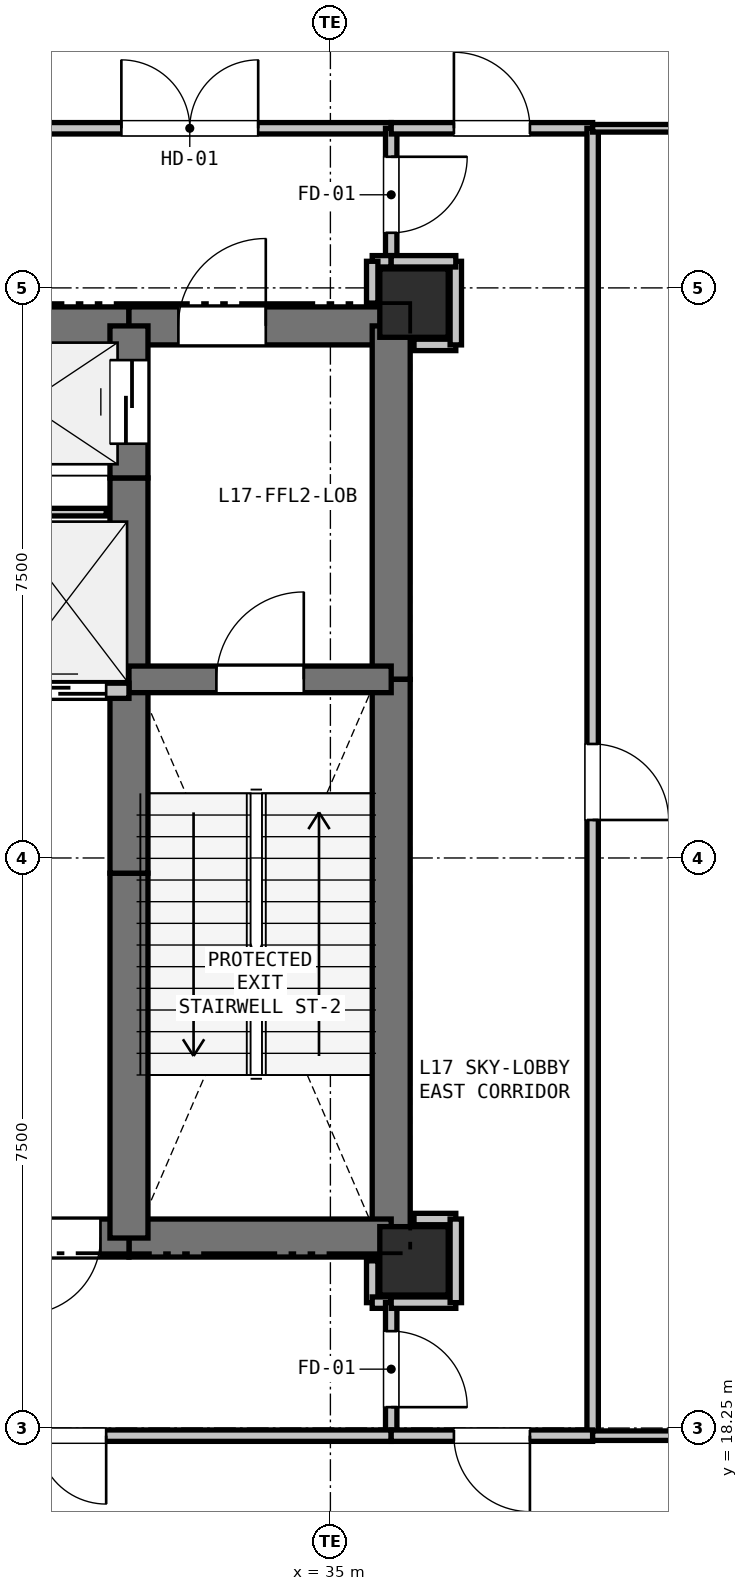
"""IFC4 building model, lengths in metres.
Left out: names, types, materials, properties, quantities, classifications, styles, units other than length and angle.
Written with IfcOpenShell. Run it as: python <this file> out.ifc"""

import sys

from ifc_helpers import new_model, si_unit, direction, frame, frame_2d, origin, origin_2d, place, context, subcontext, project, spatial, rectangle, extrude, element, fill, save


model = new_model("IFC4")
c1 = context("Model", 3, precision=1e-05, world=origin(), true_north=direction((0.0, 1.0)))
c2 = subcontext(c1, "Body", "Model", "MODEL_VIEW")
j1 = project(units=[si_unit("LENGTHUNIT", "METRE"), si_unit("PLANEANGLEUNIT", "RADIAN")], contexts=[c1])
p1 = place(None, origin())
s1 = spatial("IfcSite", under=j1, at=p1, CompositionType="ELEMENT")
p2 = place(p1, origin())
s2 = spatial("IfcBuilding", under=s1, at=p2, CompositionType="ELEMENT")
p3 = place(p2, frame((0.0, 0.0, 62.1)))
s3 = spatial("IfcBuildingStorey", under=s2, at=p3, CompositionType="ELEMENT", Elevation=62.1)
for number, where, z_axis, x_axis in (
    (1, (36.1, 33.05, 0.0), (0.0, 0.0, 1.0), (1.0, 0.0, 0.0)),
    (2, (36.1, 20.45, 0.0), (0.0, 0.0, 1.0), (1.0, 0.0, 0.0)),
):
    element("IfcColumn", number, at=place(p3, frame(where, z_axis=z_axis, x_axis=x_axis)), inside=s3, PredefinedType="COLUMN", context=c2, shape_type="SweptSolid", body=[
        extrude(rectangle(XDim=0.9, YDim=0.9, at=origin_2d()), origin(), (0.0, 0.0, 1.0), 4.8),
    ])
p4 = place(p3, frame((29.65, 32.75, 0.0), z_axis=(0.0, 0.0, 1.0), x_axis=(1.0, 0.0, 0.0)))
e3 = element("IfcWall", 3, at=p4, inside=s3, PredefinedType="SHEAR", context=c2, shape_type="SweptSolid", body=[
    extrude(rectangle(XDim=2.7, YDim=0.5, at=frame_2d((1.35, 0.0))), origin(), (0.0, 0.0, 1.0), 4.48),
])
p5 = place(p3, frame((32.35, 32.75, 0.0), z_axis=(0.0, 0.0, 1.0), x_axis=(1.0, 0.0, 0.0)))
e4 = element("IfcWall", 4, at=p5, inside=s3, PredefinedType="SHEAR", context=c2, shape_type="SweptSolid", body=[
    extrude(rectangle(XDim=3.45, YDim=0.5, at=frame_2d((1.725, 0.0))), origin(), (0.0, 0.0, 1.0), 4.48),
])
p6 = place(p5, frame((0.65, 0.0, 0.0)))
e5 = element("IfcOpeningElement", 5, at=p6, cuts=e4, PredefinedType="OPENING", context=c2, shape_type="SweptSolid", body=[
    extrude(rectangle(XDim=1.15, YDim=2.15, at=frame_2d((0.575, 1.075))), frame((0.0, 0.26, 0.0), z_axis=(0.0, -1.0, 0.0), x_axis=(1.0, 0.0, 0.0)), (0.0, 0.0, 1.0), 0.52),
])
p7 = place(p3, frame((35.8, 32.75, 0.0), z_axis=(0.0, 0.0, 1.0), x_axis=(0.0, -1.0, 0.0)))
e6 = element("IfcWall", 6, at=p7, inside=s3, PredefinedType="SHEAR", context=c2, shape_type="SweptSolid", body=[
    extrude(rectangle(XDim=4.65, YDim=0.5, at=frame_2d((2.325, 0.0))), origin(), (0.0, 0.0, 1.0), 4.48),
])
p8 = place(p3, frame((35.8, 28.1, 0.0), z_axis=(0.0, 0.0, 1.0), x_axis=(0.0, -1.0, 0.0)))
e7 = element("IfcWall", 7, at=p8, inside=s3, PredefinedType="SHEAR", context=c2, shape_type="SweptSolid", body=[
    extrude(rectangle(XDim=7.35, YDim=0.5, at=frame_2d((3.675, 0.0))), origin(), (0.0, 0.0, 1.0), 4.48),
])
p9 = place(p3, frame((35.8, 20.75, 0.0), z_axis=(0.0, 0.0, 1.0), x_axis=(-1.0, 0.0, 0.0)))
e8 = element("IfcWall", 8, at=p9, inside=s3, PredefinedType="SHEAR", context=c2, shape_type="SweptSolid", body=[
    extrude(rectangle(XDim=3.45, YDim=0.5, at=frame_2d((1.725, 0.0))), origin(), (0.0, 0.0, 1.0), 4.48),
])
p10 = place(p3, frame((32.35, 20.75, 0.0), z_axis=(0.0, 0.0, 1.0), x_axis=(-1.0, 0.0, 0.0)))
e9 = element("IfcWall", 9, at=p10, inside=s3, PredefinedType="SHEAR", context=c2, shape_type="SweptSolid", body=[
    extrude(rectangle(XDim=1.75, YDim=0.5, at=frame_2d((0.875, 0.0))), origin(), (0.0, 0.0, 1.0), 4.48),
])
p11 = place(p10, frame((0.375, 0.0, 0.0)))
e10 = element("IfcOpeningElement", 10, at=p11, cuts=e9, PredefinedType="OPENING", context=c2, shape_type="SweptSolid", body=[
    extrude(rectangle(XDim=1.0, YDim=2.15, at=frame_2d((0.5, 1.075))), frame((0.0, 0.26, 0.0), z_axis=(0.0, -1.0, 0.0), x_axis=(1.0, 0.0, 0.0)), (0.0, 0.0, 1.0), 0.52),
])
p12 = place(p3, frame((32.35, 20.75, 0.0), z_axis=(0.0, 0.0, 1.0), x_axis=(0.0, 1.0, 0.0)))
e11 = element("IfcWall", 11, at=p12, inside=s3, PredefinedType="SHEAR", context=c2, shape_type="SweptSolid", body=[
    extrude(rectangle(XDim=4.8, YDim=0.5, at=frame_2d((2.4, 0.0))), origin(), (0.0, 0.0, 1.0), 4.48),
])
p13 = place(p3, frame((32.35, 25.55, 0.0), z_axis=(0.0, 0.0, 1.0), x_axis=(0.0, 1.0, 0.0)))
e12 = element("IfcWall", 12, at=p13, inside=s3, PredefinedType="SHEAR", context=c2, shape_type="SweptSolid", body=[
    extrude(rectangle(XDim=2.4, YDim=0.5, at=frame_2d((1.2, 0.0))), origin(), (0.0, 0.0, 1.0), 4.48),
])
p14 = place(p3, frame((32.35, 27.95, 0.0), z_axis=(0.0, 0.0, 1.0), x_axis=(0.0, 1.0, 0.0)))
e13 = element("IfcWall", 13, at=p14, inside=s3, PredefinedType="SHEAR", context=c2, shape_type="SweptSolid", body=[
    extrude(rectangle(XDim=2.8, YDim=0.5, at=frame_2d((1.4, 0.0))), origin(), (0.0, 0.0, 1.0), 4.48),
])
p15 = place(p3, frame((32.35, 30.75, 0.0), z_axis=(0.0, 0.0, 1.0), x_axis=(0.0, 1.0, 0.0)))
e14 = element("IfcWall", 14, at=p15, inside=s3, PredefinedType="SHEAR", context=c2, shape_type="SweptSolid", body=[
    extrude(rectangle(XDim=2.0, YDim=0.5, at=frame_2d((1.0, 0.0))), origin(), (0.0, 0.0, 1.0), 4.48),
])
p16 = place(p15, frame((0.45, 0.0, 0.0)))
e15 = element("IfcOpeningElement", 15, at=p16, cuts=e14, PredefinedType="OPENING", context=c2, shape_type="SweptSolid", body=[
    extrude(rectangle(XDim=1.1, YDim=2.15, at=frame_2d((0.55, 1.075))), frame((0.0, 0.26, 0.0), z_axis=(0.0, -1.0, 0.0), x_axis=(1.0, 0.0, 0.0)), (0.0, 0.0, 1.0), 0.52),
])
p17 = place(p3, frame((32.35, 28.1, 0.0), z_axis=(0.0, 0.0, 1.0), x_axis=(1.0, 0.0, 0.0)))
e16 = element("IfcWall", 16, at=p17, inside=s3, PredefinedType="SHEAR", context=c2, shape_type="SweptSolid", body=[
    extrude(rectangle(XDim=3.45, YDim=0.35, at=frame_2d((1.725, 0.0))), origin(), (0.0, 0.0, 1.0), 4.48),
])
p18 = place(p17, frame((1.15, 0.0, 0.0)))
e17 = element("IfcOpeningElement", 17, at=p18, cuts=e16, PredefinedType="OPENING", context=c2, shape_type="SweptSolid", body=[
    extrude(rectangle(XDim=1.15, YDim=2.15, at=frame_2d((0.575, 1.075))), frame((0.0, 0.185, 0.0), z_axis=(0.0, -1.0, 0.0), x_axis=(1.0, 0.0, 0.0)), (0.0, 0.0, 1.0), 0.37),
])
p19 = place(p3, frame((27.4, 27.95, 0.0), z_axis=(0.0, 0.0, 1.0), x_axis=(1.0, 0.0, 0.0)))
e18 = element("IfcWall", 18, at=p19, inside=s3, PredefinedType="PARTITIONING", context=c2, shape_type="SweptSolid", body=[
    extrude(rectangle(XDim=4.95, YDim=0.2, at=frame_2d((2.475, 0.0))), origin(), (0.0, 0.0, 1.0), 4.48),
])
p20 = place(p19, frame((0.25, 0.0, 0.0)))
e19 = element("IfcOpeningElement", 19, at=p20, cuts=e18, PredefinedType="OPENING", context=c2, shape_type="SweptSolid", body=[
    extrude(rectangle(XDim=1.1, YDim=2.15, at=frame_2d((0.55, 1.075))), frame((0.0, 0.11, 0.0), z_axis=(0.0, -1.0, 0.0), x_axis=(1.0, 0.0, 0.0)), (0.0, 0.0, 1.0), 0.22),
])
p21 = place(p19, frame((1.9, 0.0, 0.0)))
e20 = element("IfcOpeningElement", 20, at=p21, cuts=e18, PredefinedType="OPENING", context=c2, shape_type="SweptSolid", body=[
    extrude(rectangle(XDim=1.1, YDim=2.15, at=frame_2d((0.55, 1.075))), frame((0.0, 0.11, 0.0), z_axis=(0.0, -1.0, 0.0), x_axis=(1.0, 0.0, 0.0)), (0.0, 0.0, 1.0), 0.22),
])
p22 = place(p19, frame((3.55, 0.0, 0.0)))
e21 = element("IfcOpeningElement", 21, at=p22, cuts=e18, PredefinedType="OPENING", context=c2, shape_type="SweptSolid", body=[
    extrude(rectangle(XDim=1.1, YDim=2.15, at=frame_2d((0.55, 1.075))), frame((0.0, 0.11, 0.0), z_axis=(0.0, -1.0, 0.0), x_axis=(1.0, 0.0, 0.0)), (0.0, 0.0, 1.0), 0.22),
])
p23 = place(p3, frame((32.05, 30.3, 0.0), z_axis=(0.0, 0.0, 1.0), x_axis=(-1.0, 0.0, 0.0)))
e22 = element("IfcWall", 22, at=p23, inside=s3, PredefinedType="PARTITIONING", context=c2, shape_type="SweptSolid", body=[
    extrude(rectangle(XDim=1.35, YDim=0.1, at=frame_2d((0.675, 0.0))), origin(), (0.0, 0.0, 1.0), 4.48),
])
p24 = place(p3, frame((35.55, 20.45, 0.0), z_axis=(0.0, 0.0, 1.0), x_axis=(0.0, -1.0, 0.0)))
e23 = element("IfcWall", 23, at=p24, inside=s3, PredefinedType="PARTITIONING", context=c2, shape_type="SweptSolid", body=[
    extrude(rectangle(XDim=0.55, YDim=0.15, at=frame_2d((0.275, 0.0))), origin(), (0.0, 0.0, 1.0), 3.928),
])
p25 = place(p3, frame((35.55, 19.9, 0.0), z_axis=(0.0, 0.0, 1.0), x_axis=(1.0, 0.0, 0.0)))
e24 = element("IfcWall", 24, at=p25, inside=s3, PredefinedType="PARTITIONING", context=c2, shape_type="SweptSolid", body=[
    extrude(rectangle(XDim=0.25, YDim=0.15, at=frame_2d((0.125, 0.0))), origin(), (0.0, 0.0, 1.0), 4.48),
])
p26 = place(p3, frame((35.8, 19.9, 0.0), z_axis=(0.0, 0.0, 1.0), x_axis=(0.0, -1.0, 0.0)))
e25 = element("IfcWall", 25, at=p26, inside=s3, PredefinedType="PARTITIONING", context=c2, shape_type="SweptSolid", body=[
    extrude(rectangle(XDim=1.75, YDim=0.15, at=frame_2d((0.875, 0.0))), origin(), (0.0, 0.0, 1.0), 3.115),
])
p27 = place(p26, frame((0.375, 0.0, 0.0)))
e26 = element("IfcOpeningElement", 26, at=p27, cuts=e25, PredefinedType="OPENING", context=c2, shape_type="SweptSolid", body=[
    extrude(rectangle(XDim=1.0, YDim=2.15, at=frame_2d((0.5, 1.075))), frame((0.0, 0.085, 0.0), z_axis=(0.0, -1.0, 0.0), x_axis=(1.0, 0.0, 0.0)), (0.0, 0.0, 1.0), 0.17),
])
p28 = place(p3, frame((35.8, 18.15, 0.0), z_axis=(0.0, 0.0, 1.0), x_axis=(-1.0, 0.0, 0.0)))
e27 = element("IfcWall", 27, at=p28, inside=s3, PredefinedType="PARTITIONING", context=c2, shape_type="SweptSolid", body=[
    extrude(rectangle(XDim=9.3, YDim=0.15, at=frame_2d((4.65, 0.0))), origin(), (0.0, 0.0, 1.0), 2.865),
])
p29 = place(p28, frame((3.75, 0.0, 0.0)))
e28 = element("IfcOpeningElement", 28, at=p29, cuts=e27, PredefinedType="OPENING", context=c2, shape_type="SweptSolid", body=[
    extrude(rectangle(XDim=1.8, YDim=2.2, at=frame_2d((0.9, 1.1))), frame((0.0, 0.085, 0.0), z_axis=(0.0, -1.0, 0.0), x_axis=(1.0, 0.0, 0.0)), (0.0, 0.0, 1.0), 0.17),
])
p30 = place(p3, frame((30.5, 35.35, 0.0), z_axis=(0.0, 0.0, 1.0), x_axis=(1.0, 0.0, 0.0)))
e29 = element("IfcWall", 29, at=p30, inside=s3, PredefinedType="PARTITIONING", context=c2, shape_type="SweptSolid", body=[
    extrude(rectangle(XDim=5.3, YDim=0.15, at=frame_2d((2.65, 0.0))), origin(), (0.0, 0.0, 1.0), 2.865),
])
p31 = place(p30, frame((1.75, 0.0, 0.0)))
e30 = element("IfcOpeningElement", 30, at=p31, cuts=e29, PredefinedType="OPENING", context=c2, shape_type="SweptSolid", body=[
    extrude(rectangle(XDim=1.8, YDim=2.2, at=frame_2d((0.9, 1.1))), frame((0.0, 0.085, 0.0), z_axis=(0.0, -1.0, 0.0), x_axis=(1.0, 0.0, 0.0)), (0.0, 0.0, 1.0), 0.17),
])
p32 = place(p3, frame((35.8, 35.35, 0.0), z_axis=(0.0, 0.0, 1.0), x_axis=(0.0, -1.0, 0.0)))
e31 = element("IfcWall", 31, at=p32, inside=s3, PredefinedType="PARTITIONING", context=c2, shape_type="SweptSolid", body=[
    extrude(rectangle(XDim=1.75, YDim=0.15, at=frame_2d((0.875, 0.0))), origin(), (0.0, 0.0, 1.0), 2.865),
])
p33 = place(p32, frame((0.375, 0.0, 0.0)))
e32 = element("IfcOpeningElement", 32, at=p33, cuts=e31, PredefinedType="OPENING", context=c2, shape_type="SweptSolid", body=[
    extrude(rectangle(XDim=1.0, YDim=2.15, at=frame_2d((0.5, 1.075))), frame((0.0, 0.085, 0.0), z_axis=(0.0, -1.0, 0.0), x_axis=(1.0, 0.0, 0.0)), (0.0, 0.0, 1.0), 0.17),
])
p34 = place(p3, frame((35.8, 33.6, 0.0), z_axis=(0.0, 0.0, 1.0), x_axis=(-1.0, 0.0, 0.0)))
e33 = element("IfcWall", 33, at=p34, inside=s3, PredefinedType="PARTITIONING", context=c2, shape_type="SweptSolid", body=[
    extrude(rectangle(XDim=0.25, YDim=0.15, at=frame_2d((0.125, 0.0))), origin(), (0.0, 0.0, 1.0), 3.115),
])
p35 = place(p3, frame((35.55, 33.6, 0.0), z_axis=(0.0, 0.0, 1.0), x_axis=(0.0, -1.0, 0.0)))
e34 = element("IfcWall", 34, at=p35, inside=s3, PredefinedType="PARTITIONING", context=c2, shape_type="SweptSolid", body=[
    extrude(rectangle(XDim=0.55, YDim=0.15, at=frame_2d((0.275, 0.0))), origin(), (0.0, 0.0, 1.0), 3.115),
])
for number, where, z_axis, x_axis in (
    (35, (36.65, 21.0, 0.0), (0.0, 0.0, 1.0), (-1.0, 0.0, 0.0)),
    (36, (36.1, 32.5, 0.0), (0.0, 0.0, 1.0), (1.0, 0.0, 0.0)),
):
    element("IfcWall", number, at=place(p3, frame(where, z_axis=z_axis, x_axis=x_axis)), inside=s3, PredefinedType="PARTITIONING", context=c2, shape_type="SweptSolid", body=[
        extrude(rectangle(XDim=0.55, YDim=0.15, at=frame_2d((0.275, 0.0))), origin(), (0.0, 0.0, 1.0), 3.928),
    ])
p36 = place(p3, frame((36.65, 32.5, 0.0), z_axis=(0.0, 0.0, 1.0), x_axis=(0.0, 1.0, 0.0)))
e37 = element("IfcWall", 37, at=p36, inside=s3, PredefinedType="PARTITIONING", context=c2, shape_type="SweptSolid", body=[
    extrude(rectangle(XDim=1.1, YDim=0.15, at=frame_2d((0.55, 0.0))), origin(), (0.0, 0.0, 1.0), 3.115),
])
p37 = place(p3, frame((36.65, 33.6, 0.0), z_axis=(0.0, 0.0, 1.0), x_axis=(-1.0, 0.0, 0.0)))
e38 = element("IfcWall", 38, at=p37, inside=s3, PredefinedType="PARTITIONING", context=c2, shape_type="SweptSolid", body=[
    extrude(rectangle(XDim=0.85, YDim=0.15, at=frame_2d((0.425, 0.0))), origin(), (0.0, 0.0, 1.0), 3.115),
])
p38 = place(p3, frame((35.8, 35.35, 0.0), z_axis=(0.0, 0.0, 1.0), x_axis=(1.0, 0.0, 0.0)))
e39 = element("IfcWall", 39, at=p38, inside=s3, PredefinedType="PARTITIONING", context=c2, shape_type="SweptSolid", body=[
    extrude(rectangle(XDim=2.65, YDim=0.15, at=frame_2d((1.325, 0.0))), origin(), (0.0, 0.0, 1.0), 2.865),
])
p39 = place(p38, frame((0.825, 0.0, 0.0)))
e40 = element("IfcOpeningElement", 40, at=p39, cuts=e39, PredefinedType="OPENING", context=c2, shape_type="SweptSolid", body=[
    extrude(rectangle(XDim=1.0, YDim=2.15, at=frame_2d((0.5, 1.075))), frame((0.0, 0.085, 0.0), z_axis=(0.0, -1.0, 0.0), x_axis=(1.0, 0.0, 0.0)), (0.0, 0.0, 1.0), 0.17),
])
p40 = place(p3, frame((38.45, 35.35, 0.0), z_axis=(0.0, 0.0, 1.0), x_axis=(0.0, -1.0, 0.0)))
e41 = element("IfcWall", 41, at=p40, inside=s3, PredefinedType="PARTITIONING", context=c2, shape_type="SweptSolid", body=[
    extrude(rectangle(XDim=17.2, YDim=0.15, at=frame_2d((8.6, 0.0))), origin(), (0.0, 0.0, 1.0), 3.115),
])
p41 = place(p40, frame((8.1, 0.0, 0.0)))
e42 = element("IfcOpeningElement", 42, at=p41, cuts=e41, PredefinedType="OPENING", context=c2, shape_type="SweptSolid", body=[
    extrude(rectangle(XDim=1.0, YDim=2.15, at=frame_2d((0.5, 1.075))), frame((0.0, 0.085, 0.0), z_axis=(0.0, -1.0, 0.0), x_axis=(1.0, 0.0, 0.0)), (0.0, 0.0, 1.0), 0.17),
])
p42 = place(p3, frame((38.45, 18.15, 0.0), z_axis=(0.0, 0.0, 1.0), x_axis=(-1.0, 0.0, 0.0)))
e43 = element("IfcWall", 43, at=p42, inside=s3, PredefinedType="PARTITIONING", context=c2, shape_type="SweptSolid", body=[
    extrude(rectangle(XDim=2.65, YDim=0.15, at=frame_2d((1.325, 0.0))), origin(), (0.0, 0.0, 1.0), 3.115),
])
p43 = place(p42, frame((0.825, 0.0, 0.0)))
e44 = element("IfcOpeningElement", 44, at=p43, cuts=e43, PredefinedType="OPENING", context=c2, shape_type="SweptSolid", body=[
    extrude(rectangle(XDim=1.0, YDim=2.15, at=frame_2d((0.5, 1.075))), frame((0.0, 0.085, 0.0), z_axis=(0.0, -1.0, 0.0), x_axis=(1.0, 0.0, 0.0)), (0.0, 0.0, 1.0), 0.17),
])
p44 = place(p3, frame((35.8, 19.9, 0.0), z_axis=(0.0, 0.0, 1.0), x_axis=(1.0, 0.0, 0.0)))
e45 = element("IfcWall", 45, at=p44, inside=s3, PredefinedType="PARTITIONING", context=c2, shape_type="SweptSolid", body=[
    extrude(rectangle(XDim=0.85, YDim=0.15, at=frame_2d((0.425, 0.0))), origin(), (0.0, 0.0, 1.0), 4.48),
])
p45 = place(p3, frame((36.65, 19.9, 0.0), z_axis=(0.0, 0.0, 1.0), x_axis=(0.0, 1.0, 0.0)))
e46 = element("IfcWall", 46, at=p45, inside=s3, PredefinedType="PARTITIONING", context=c2, shape_type="SweptSolid", body=[
    extrude(rectangle(XDim=1.1, YDim=0.15, at=frame_2d((0.55, 0.0))), origin(), (0.0, 0.0, 1.0), 4.48),
])
p46 = place(p3, frame((43.688, 35.35, 0.0), z_axis=(0.0, 0.0, 1.0), x_axis=(-1.0, 0.0, 0.0)))
e47 = element("IfcWall", 47, at=p46, inside=s3, PredefinedType="PARTITIONING", context=c2, shape_type="SweptSolid", body=[
    extrude(rectangle(XDim=5.239, YDim=0.1, at=frame_2d((2.619, 0.0))), origin(), (0.0, 0.0, 1.0), 2.365),
])
p47 = place(p3, frame((43.688, 18.15, 0.0), z_axis=(0.0, 0.0, 1.0), x_axis=(-1.0, 0.0, 0.0)))
e48 = element("IfcWall", 48, at=p47, inside=s3, PredefinedType="PARTITIONING", context=c2, shape_type="SweptSolid", body=[
    extrude(rectangle(XDim=5.239, YDim=0.125, at=frame_2d((2.619, 0.0))), origin(), (0.0, 0.0, 1.0), 2.365),
])
p48 = place(p22, origin())
e49 = element("IfcDoor", 49, at=p48, inside=s3, OperationType="SLIDING_TO_LEFT", PredefinedType="DOOR", context=c2, shape_type="SweptSolid", body=[
    extrude(rectangle(XDim=1.1, YDim=2.15, at=frame_2d((0.55, 1.075))), frame((0.0, 0.025, 0.0), z_axis=(0.0, -1.0, 0.0), x_axis=(1.0, 0.0, 0.0)), (0.0, 0.0, 1.0), 0.05),
])
fill(e21, e49)
p49 = place(p11, origin())
e50 = element("IfcDoor", 50, at=p49, inside=s3, OperationType="SINGLE_SWING_RIGHT", PredefinedType="DOOR", context=c2, shape_type="SweptSolid", body=[
    extrude(rectangle(XDim=1.0, YDim=2.15, at=frame_2d((0.5, 1.075))), frame((0.0, 0.025, 0.0), z_axis=(0.0, -1.0, 0.0), x_axis=(1.0, 0.0, 0.0)), (0.0, 0.0, 1.0), 0.05),
])
fill(e10, e50)
p50 = place(p16, origin())
e51 = element("IfcDoor", 51, at=p50, inside=s3, OperationType="SLIDING_TO_LEFT", PredefinedType="DOOR", context=c2, shape_type="SweptSolid", body=[
    extrude(rectangle(XDim=1.1, YDim=2.15, at=frame_2d((0.55, 1.075))), frame((0.0, 0.025, 0.0), z_axis=(0.0, -1.0, 0.0), x_axis=(1.0, 0.0, 0.0)), (0.0, 0.0, 1.0), 0.05),
])
fill(e15, e51)
p51 = place(p18, origin())
e52 = element("IfcDoor", 52, at=p51, inside=s3, OperationType="SINGLE_SWING_RIGHT", PredefinedType="DOOR", context=c2, shape_type="SweptSolid", body=[
    extrude(rectangle(XDim=1.15, YDim=2.15, at=frame_2d((0.575, 1.075))), frame((0.0, 0.025, 0.0), z_axis=(0.0, -1.0, 0.0), x_axis=(1.0, 0.0, 0.0)), (0.0, 0.0, 1.0), 0.05),
])
fill(e17, e52)
p52 = place(p6, origin())
e53 = element("IfcDoor", 53, at=p52, inside=s3, OperationType="SINGLE_SWING_RIGHT", PredefinedType="DOOR", context=c2, shape_type="SweptSolid", body=[
    extrude(rectangle(XDim=1.15, YDim=2.15, at=frame_2d((0.575, 1.075))), frame((0.0, 0.025, 0.0), z_axis=(0.0, -1.0, 0.0), x_axis=(1.0, 0.0, 0.0)), (0.0, 0.0, 1.0), 0.05),
])
fill(e5, e53)
p53 = place(p27, origin())
e54 = element("IfcDoor", 54, at=p53, inside=s3, OperationType="SINGLE_SWING_RIGHT", PredefinedType="DOOR", context=c2, shape_type="SweptSolid", body=[
    extrude(rectangle(XDim=1.0, YDim=2.15, at=frame_2d((0.5, 1.075))), frame((0.0, 0.025, 0.0), z_axis=(0.0, -1.0, 0.0), x_axis=(1.0, 0.0, 0.0)), (0.0, 0.0, 1.0), 0.05),
])
fill(e26, e54)
p54 = place(p33, origin())
e55 = element("IfcDoor", 55, at=p54, inside=s3, OperationType="SINGLE_SWING_LEFT", PredefinedType="DOOR", context=c2, shape_type="SweptSolid", body=[
    extrude(rectangle(XDim=1.0, YDim=2.15, at=frame_2d((0.5, 1.075))), frame((0.0, 0.025, 0.0), z_axis=(0.0, -1.0, 0.0), x_axis=(1.0, 0.0, 0.0)), (0.0, 0.0, 1.0), 0.05),
])
fill(e32, e55)
p55 = place(p31, origin())
e56 = element("IfcDoor", 56, at=p55, inside=s3, OperationType="DOUBLE_DOOR_SINGLE_SWING", PredefinedType="DOOR", context=c2, shape_type="SweptSolid", body=[
    extrude(rectangle(XDim=1.8, YDim=2.2, at=frame_2d((0.9, 1.1))), frame((0.0, 0.025, 0.0), z_axis=(0.0, -1.0, 0.0), x_axis=(1.0, 0.0, 0.0)), (0.0, 0.0, 1.0), 0.05),
])
fill(e30, e56)
p56 = place(p29, origin())
e57 = element("IfcDoor", 57, at=p56, inside=s3, OperationType="DOUBLE_DOOR_SINGLE_SWING", PredefinedType="DOOR", context=c2, shape_type="SweptSolid", body=[
    extrude(rectangle(XDim=1.8, YDim=2.2, at=frame_2d((0.9, 1.1))), frame((0.0, 0.025, 0.0), z_axis=(0.0, -1.0, 0.0), x_axis=(1.0, 0.0, 0.0)), (0.0, 0.0, 1.0), 0.05),
])
fill(e28, e57)
p57 = place(p39, origin())
e58 = element("IfcDoor", 58, at=p57, inside=s3, OperationType="SINGLE_SWING_LEFT", PredefinedType="DOOR", context=c2, shape_type="SweptSolid", body=[
    extrude(rectangle(XDim=1.0, YDim=2.15, at=frame_2d((0.5, 1.075))), frame((0.0, 0.025, 0.0), z_axis=(0.0, -1.0, 0.0), x_axis=(1.0, 0.0, 0.0)), (0.0, 0.0, 1.0), 0.05),
])
fill(e40, e58)
p58 = place(p41, origin())
e59 = element("IfcDoor", 59, at=p58, inside=s3, OperationType="SINGLE_SWING_RIGHT", PredefinedType="DOOR", context=c2, shape_type="SweptSolid", body=[
    extrude(rectangle(XDim=1.0, YDim=2.15, at=frame_2d((0.5, 1.075))), frame((0.0, 0.025, 0.0), z_axis=(0.0, -1.0, 0.0), x_axis=(1.0, 0.0, 0.0)), (0.0, 0.0, 1.0), 0.05),
])
fill(e42, e59)
p59 = place(p43, origin())
e60 = element("IfcDoor", 60, at=p59, inside=s3, OperationType="SINGLE_SWING_LEFT", PredefinedType="DOOR", context=c2, shape_type="SweptSolid", body=[
    extrude(rectangle(XDim=1.0, YDim=2.15, at=frame_2d((0.5, 1.075))), frame((0.0, 0.025, 0.0), z_axis=(0.0, -1.0, 0.0), x_axis=(1.0, 0.0, 0.0)), (0.0, 0.0, 1.0), 0.05),
])
fill(e44, e60)
save(model, sys.argv[1])
